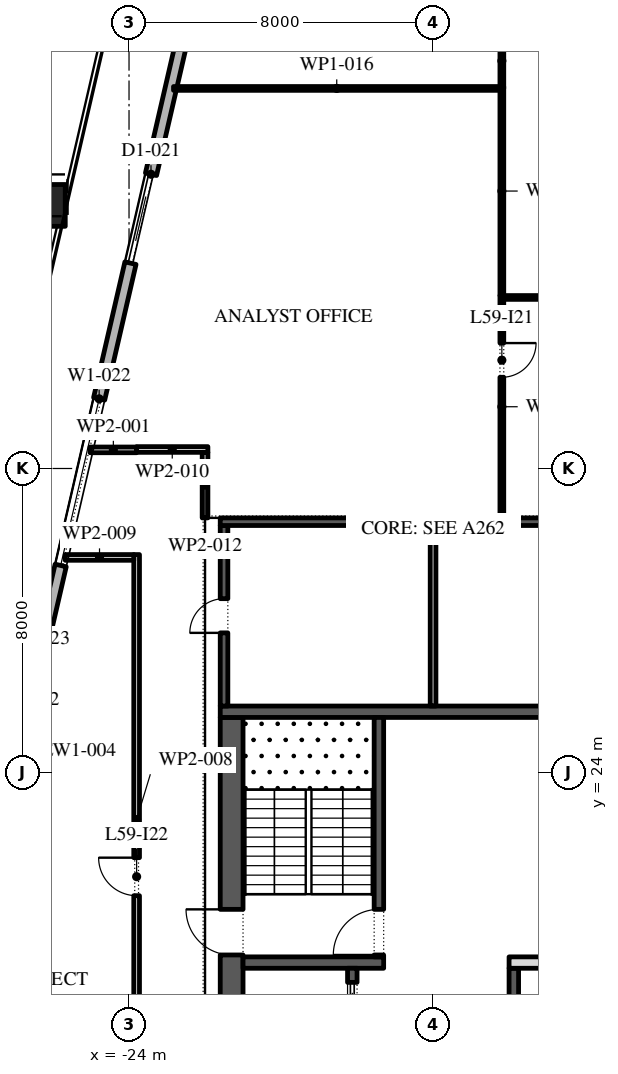
"""IFC4 building model, lengths in metres.
Left out: names, types, materials, properties, quantities, classifications, styles, units other than length and angle.
Written with IfcOpenShell. Run it as: python <this file> out.ifc"""

import sys

from ifc_helpers import new_model, si_unit, direction, frame, frame_2d, origin, origin_2d, place, context, subcontext, project, spatial, rectangle, extrude, element, fill, save


model = new_model("IFC4")
c1 = context("Model", 3, precision=1e-05, world=origin(), true_north=direction((0.0, 1.0)))
c2 = subcontext(c1, "Body", "Model", "MODEL_VIEW")
j1 = project(units=[si_unit("LENGTHUNIT", "METRE"), si_unit("PLANEANGLEUNIT", "RADIAN")], contexts=[c1])
p1 = place(None, origin())
s1 = spatial("IfcSite", under=j1, at=p1, CompositionType="ELEMENT")
p2 = place(p1, origin())
s2 = spatial("IfcBuilding", under=s1, at=p2, CompositionType="ELEMENT")
p3 = place(p2, frame((0.0, 0.0, 272.4)))
s3 = spatial("IfcBuildingStorey", under=s2, at=p3, CompositionType="ELEMENT", Elevation=272.4)
p4 = place(p3, frame((-26.228, 38.922, 0.0), z_axis=(0.014558945825, 0.063166103598, 0.997896828561), x_axis=(-0.97445148511, 0.224598092528, 0.0)))
e1 = element("IfcColumn", 1, at=p4, inside=s3, PredefinedType="COLUMN", context=c2, shape_type="SweptSolid", body=[
    extrude(rectangle(XDim=1.1, YDim=1.1, at=origin_2d()), origin(), (0.0, 0.0, 1.0), 4.209),
])
p5 = place(p3, frame((29.616, 40.758, 0.0), z_axis=(0.0, 0.0, 1.0), x_axis=(-0.974370532314, 0.224949029246, 0.0)))
e2 = element("IfcWall", 2, at=p5, inside=s3, PredefinedType="STANDARD", context=c2, shape_type="SweptSolid", body=[
    extrude(rectangle(XDim=48.0, YDim=0.3, at=frame_2d((24.0, 0.0))), origin(), (0.0, 0.0, 1.0), 4.0),
])
p6 = place(p5, frame((1.625, 0.0, 0.45)))
e3 = element("IfcOpeningElement", 3, at=p6, cuts=e2, PredefinedType="OPENING", context=c2, shape_type="SweptSolid", body=[
    extrude(rectangle(XDim=4.5, YDim=2.575, at=frame_2d((2.25, 1.288))), frame((0.0, 0.16, 0.0), z_axis=(0.0, -1.0, 0.0), x_axis=(1.0, 0.0, 0.0)), (0.0, 0.0, 1.0), 0.32),
])
p7 = place(p5, frame((10.575, 0.0, 0.0)))
e4 = element("IfcOpeningElement", 4, at=p7, cuts=e2, PredefinedType="OPENING", context=c2, shape_type="SweptSolid", body=[
    extrude(rectangle(XDim=2.4, YDim=3.5, at=frame_2d((1.2, 1.75))), frame((0.0, 0.16, 0.0), z_axis=(0.0, -1.0, 0.0), x_axis=(1.0, 0.0, 0.0)), (0.0, 0.0, 1.0), 0.32),
])
p8 = place(p5, frame((17.575, 0.0, 0.45)))
e5 = element("IfcOpeningElement", 5, at=p8, cuts=e2, PredefinedType="OPENING", context=c2, shape_type="SweptSolid", body=[
    extrude(rectangle(XDim=4.5, YDim=2.45, at=frame_2d((2.25, 1.225))), frame((0.0, 0.16, 0.0), z_axis=(0.0, -1.0, 0.0), x_axis=(1.0, 0.0, 0.0)), (0.0, 0.0, 1.0), 0.32),
])
p9 = place(p5, frame((25.625, 0.0, 0.45)))
e6 = element("IfcOpeningElement", 6, at=p9, cuts=e2, PredefinedType="OPENING", context=c2, shape_type="SweptSolid", body=[
    extrude(rectangle(XDim=4.5, YDim=2.45, at=frame_2d((2.25, 1.225))), frame((0.0, 0.16, 0.0), z_axis=(0.0, -1.0, 0.0), x_axis=(1.0, 0.0, 0.0)), (0.0, 0.0, 1.0), 0.32),
])
p10 = place(p5, frame((33.675, 0.0, 0.45)))
e7 = element("IfcOpeningElement", 7, at=p10, cuts=e2, PredefinedType="OPENING", context=c2, shape_type="SweptSolid", body=[
    extrude(rectangle(XDim=4.5, YDim=2.45, at=frame_2d((2.25, 1.225))), frame((0.0, 0.16, 0.0), z_axis=(0.0, -1.0, 0.0), x_axis=(1.0, 0.0, 0.0)), (0.0, 0.0, 1.0), 0.32),
])
p11 = place(p5, frame((42.175, 0.0, 0.0)))
e8 = element("IfcOpeningElement", 8, at=p11, cuts=e2, PredefinedType="OPENING", context=c2, shape_type="SweptSolid", body=[
    extrude(rectangle(XDim=2.4, YDim=3.5, at=frame_2d((1.2, 1.75))), frame((0.0, 0.16, 0.0), z_axis=(0.0, -1.0, 0.0), x_axis=(1.0, 0.0, 0.0)), (0.0, 0.0, 1.0), 0.32),
])
p12 = place(p3, frame((-21.359, 48.678, 0.0), z_axis=(0.0, 0.0, 1.0), x_axis=(-0.224949198343, -0.974370493275, 0.0)))
e9 = element("IfcWall", 9, at=p12, inside=s3, PredefinedType="STANDARD", context=c2, shape_type="SweptSolid", body=[
    extrude(rectangle(XDim=49.5, YDim=0.3, at=frame_2d((24.75, 0.0))), origin(), (0.0, 0.0, 1.0), 4.0),
])
p13 = place(p12, frame((1.157, 0.0, 0.45)))
e10 = element("IfcOpeningElement", 10, at=p13, cuts=e9, PredefinedType="OPENING", context=c2, shape_type="SweptSolid", body=[
    extrude(rectangle(XDim=4.5, YDim=3.05, at=frame_2d((2.25, 1.525))), frame((0.0, 0.16, 0.0), z_axis=(0.0, -1.0, 0.0), x_axis=(1.0, 0.0, 0.0)), (0.0, 0.0, 1.0), 0.32),
])
p14 = place(p12, frame((9.171, 0.0, 0.0)))
e11 = element("IfcOpeningElement", 11, at=p14, cuts=e9, PredefinedType="OPENING", context=c2, shape_type="SweptSolid", body=[
    extrude(rectangle(XDim=2.4, YDim=3.5, at=frame_2d((1.2, 1.75))), frame((0.0, 0.16, 0.0), z_axis=(0.0, -1.0, 0.0), x_axis=(1.0, 0.0, 0.0)), (0.0, 0.0, 1.0), 0.32),
])
p15 = place(p12, frame((15.236, 0.0, 0.45)))
e12 = element("IfcOpeningElement", 12, at=p15, cuts=e9, PredefinedType="OPENING", context=c2, shape_type="SweptSolid", body=[
    extrude(rectangle(XDim=4.5, YDim=3.05, at=frame_2d((2.25, 1.525))), frame((0.0, 0.16, 0.0), z_axis=(0.0, -1.0, 0.0), x_axis=(1.0, 0.0, 0.0)), (0.0, 0.0, 1.0), 0.32),
])
p16 = place(p12, frame((22.35, 0.0, 0.45)))
e13 = element("IfcOpeningElement", 13, at=p16, cuts=e9, PredefinedType="OPENING", context=c2, shape_type="SweptSolid", body=[
    extrude(rectangle(XDim=4.5, YDim=3.05, at=frame_2d((2.25, 1.525))), frame((0.0, 0.16, 0.0), z_axis=(0.0, -1.0, 0.0), x_axis=(1.0, 0.0, 0.0)), (0.0, 0.0, 1.0), 0.32),
])
p17 = place(p12, frame((29.464, 0.0, 0.45)))
e14 = element("IfcOpeningElement", 14, at=p17, cuts=e9, PredefinedType="OPENING", context=c2, shape_type="SweptSolid", body=[
    extrude(rectangle(XDim=4.5, YDim=3.05, at=frame_2d((2.25, 1.525))), frame((0.0, 0.16, 0.0), z_axis=(0.0, -1.0, 0.0), x_axis=(1.0, 0.0, 0.0)), (0.0, 0.0, 1.0), 0.32),
])
p18 = place(p12, frame((37.628, 0.0, 0.0)))
e15 = element("IfcOpeningElement", 15, at=p18, cuts=e9, PredefinedType="OPENING", context=c2, shape_type="SweptSolid", body=[
    extrude(rectangle(XDim=2.4, YDim=3.325, at=frame_2d((1.2, 1.663))), frame((0.0, 0.16, 0.0), z_axis=(0.0, -1.0, 0.0), x_axis=(1.0, 0.0, 0.0)), (0.0, 0.0, 1.0), 0.32),
])
p19 = place(p12, frame((43.693, 0.0, 0.45)))
e16 = element("IfcOpeningElement", 16, at=p19, cuts=e9, PredefinedType="OPENING", context=c2, shape_type="SweptSolid", body=[
    extrude(rectangle(XDim=4.5, YDim=2.825, at=frame_2d((2.25, 1.413))), frame((0.0, 0.16, 0.0), z_axis=(0.0, -1.0, 0.0), x_axis=(1.0, 0.0, 0.0)), (0.0, 0.0, 1.0), 0.32),
])
p20 = place(p3, frame((-21.3, -2.45, 0.0), z_axis=(0.0, 0.0, 1.0), x_axis=(0.0, 1.0, 0.0)))
e17 = element("IfcWall", 17, at=p20, inside=s3, PredefinedType="SHEAR", context=c2, shape_type="SweptSolid", body=[
    extrude(rectangle(XDim=27.9, YDim=0.6, at=frame_2d((13.95, 0.0))), origin(), (0.0, 0.0, 1.0), 4.0),
])
p21 = place(p20, frame((5.05, 0.0, 0.0)))
e18 = element("IfcOpeningElement", 18, at=p21, cuts=e17, PredefinedType="OPENING", context=c2, shape_type="SweptSolid", body=[
    extrude(rectangle(XDim=1.2, YDim=2.1, at=frame_2d((0.6, 1.05))), frame((0.0, 0.31, 0.0), z_axis=(0.0, -1.0, 0.0), x_axis=(1.0, 0.0, 0.0)), (0.0, 0.0, 1.0), 0.62),
])
p22 = place(p20, frame((21.65, 0.0, 0.0)))
e19 = element("IfcOpeningElement", 19, at=p22, cuts=e17, PredefinedType="OPENING", context=c2, shape_type="SweptSolid", body=[
    extrude(rectangle(XDim=1.2, YDim=2.1, at=frame_2d((0.6, 1.05))), frame((0.0, 0.31, 0.0), z_axis=(0.0, -1.0, 0.0), x_axis=(1.0, 0.0, 0.0)), (0.0, 0.0, 1.0), 0.62),
])
p23 = place(p3, frame((-21.6, 25.6, 0.0), z_axis=(0.0, 0.0, 1.0), x_axis=(1.0, 0.0, 0.0)))
e20 = element("IfcWall", 20, at=p23, inside=s3, PredefinedType="SHEAR", context=c2, shape_type="SweptSolid", body=[
    extrude(rectangle(XDim=11.2, YDim=0.3, at=frame_2d((5.6, 0.0))), origin(), (0.0, 0.0, 1.0), 4.0),
])
p24 = place(p3, frame((-21.0, 19.0, 0.0), z_axis=(0.0, 0.0, 1.0), x_axis=(1.0, 0.0, 0.0)))
e21 = element("IfcWall", 21, at=p24, inside=s3, PredefinedType="SHEAR", context=c2, shape_type="SweptSolid", body=[
    extrude(rectangle(XDim=3.7, YDim=0.3, at=frame_2d((1.85, 0.0))), origin(), (0.0, 0.0, 1.0), 4.0),
])
p25 = place(p3, frame((-17.425, 19.15, 0.0), z_axis=(0.0, 0.0, 1.0), x_axis=(0.0, 1.0, 0.0)))
e22 = element("IfcWall", 22, at=p25, inside=s3, PredefinedType="SHEAR", context=c2, shape_type="SweptSolid", body=[
    extrude(rectangle(XDim=6.3, YDim=0.25, at=frame_2d((3.15, 0.0))), origin(), (0.0, 0.0, 1.0), 4.0),
])
p26 = place(p25, frame((0.05, 0.0, 0.0)))
e23 = element("IfcOpeningElement", 23, at=p26, cuts=e22, PredefinedType="OPENING", context=c2, shape_type="SweptSolid", body=[
    extrude(rectangle(XDim=1.2, YDim=2.1, at=frame_2d((0.6, 1.05))), frame((0.0, 0.135, 0.0), z_axis=(0.0, -1.0, 0.0), x_axis=(1.0, 0.0, 0.0)), (0.0, 0.0, 1.0), 0.27),
])
p27 = place(p3, frame((-18.125, 4.15, 0.0), z_axis=(0.0, 0.0, 1.0), x_axis=(0.0, 1.0, 0.0)))
e24 = element("IfcWall", 24, at=p27, inside=s3, PredefinedType="SHEAR", context=c2, shape_type="SweptSolid", body=[
    extrude(rectangle(XDim=14.7, YDim=0.25, at=frame_2d((7.35, 0.0))), origin(), (0.0, 0.0, 1.0), 4.0),
])
p28 = place(p27, frame((3.246, 0.0, 0.0)))
e25 = element("IfcOpeningElement", 25, at=p28, cuts=e24, PredefinedType="OPENING", context=c2, shape_type="SweptSolid", body=[
    extrude(rectangle(XDim=0.9, YDim=2.1, at=frame_2d((0.45, 1.05))), frame((0.0, 0.135, 0.0), z_axis=(0.0, -1.0, 0.0), x_axis=(1.0, 0.0, 0.0)), (0.0, 0.0, 1.0), 0.27),
])
p29 = place(p27, frame((8.454, 0.0, 0.0)))
e26 = element("IfcOpeningElement", 26, at=p29, cuts=e24, PredefinedType="OPENING", context=c2, shape_type="SweptSolid", body=[
    extrude(rectangle(XDim=0.9, YDim=2.1, at=frame_2d((0.45, 1.05))), frame((0.0, 0.135, 0.0), z_axis=(0.0, -1.0, 0.0), x_axis=(1.0, 0.0, 0.0)), (0.0, 0.0, 1.0), 0.27),
])
p30 = place(p27, frame((0.371, 0.0, 0.0)))
e27 = element("IfcOpeningElement", 27, at=p30, cuts=e24, PredefinedType="OPENING", context=c2, shape_type="SweptSolid", body=[
    extrude(rectangle(XDim=1.1, YDim=2.1, at=frame_2d((0.55, 1.05))), frame((0.0, 0.135, 0.0), z_axis=(0.0, -1.0, 0.0), x_axis=(1.0, 0.0, 0.0)), (0.0, 0.0, 1.0), 0.27),
])
p31 = place(p27, frame((13.229, 0.0, 0.0)))
e28 = element("IfcOpeningElement", 28, at=p31, cuts=e24, PredefinedType="OPENING", context=c2, shape_type="SweptSolid", body=[
    extrude(rectangle(XDim=1.1, YDim=2.1, at=frame_2d((0.55, 1.05))), frame((0.0, 0.135, 0.0), z_axis=(0.0, -1.0, 0.0), x_axis=(1.0, 0.0, 0.0)), (0.0, 0.0, 1.0), 0.27),
])
p32 = place(p3, frame((-13.875, -2.45, 0.0), z_axis=(0.0, 0.0, 1.0), x_axis=(0.0, 1.0, 0.0)))
e29 = element("IfcWall", 29, at=p32, inside=s3, PredefinedType="SHEAR", context=c2, shape_type="SweptSolid", body=[
    extrude(rectangle(XDim=21.3, YDim=0.25, at=frame_2d((10.65, 0.0))), origin(), (0.0, 0.0, 1.0), 4.0),
])
p33 = place(p32, frame((16.261, 0.0, 0.0)))
e30 = element("IfcOpeningElement", 30, at=p33, cuts=e29, PredefinedType="OPENING", context=c2, shape_type="SweptSolid", body=[
    extrude(rectangle(XDim=0.9, YDim=2.1, at=frame_2d((0.45, 1.05))), frame((0.0, 0.135, 0.0), z_axis=(0.0, -1.0, 0.0), x_axis=(1.0, 0.0, 0.0)), (0.0, 0.0, 1.0), 0.27),
])
p34 = place(p32, frame((19.325, 0.0, 0.0)))
e31 = element("IfcOpeningElement", 31, at=p34, cuts=e29, PredefinedType="OPENING", context=c2, shape_type="SweptSolid", body=[
    extrude(rectangle(XDim=0.9, YDim=2.1, at=frame_2d((0.45, 1.05))), frame((0.0, 0.135, 0.0), z_axis=(0.0, -1.0, 0.0), x_axis=(1.0, 0.0, 0.0)), (0.0, 0.0, 1.0), 0.27),
])
p35 = place(p32, frame((6.971, 0.0, 0.0)))
e32 = element("IfcOpeningElement", 32, at=p35, cuts=e29, PredefinedType="OPENING", context=c2, shape_type="SweptSolid", body=[
    extrude(rectangle(XDim=1.1, YDim=2.1, at=frame_2d((0.55, 1.05))), frame((0.0, 0.135, 0.0), z_axis=(0.0, -1.0, 0.0), x_axis=(1.0, 0.0, 0.0)), (0.0, 0.0, 1.0), 0.27),
])
p36 = place(p32, frame((9.114, 0.0, 0.0)))
e33 = element("IfcOpeningElement", 33, at=p36, cuts=e29, PredefinedType="OPENING", context=c2, shape_type="SweptSolid", body=[
    extrude(rectangle(XDim=1.1, YDim=2.1, at=frame_2d((0.55, 1.05))), frame((0.0, 0.135, 0.0), z_axis=(0.0, -1.0, 0.0), x_axis=(1.0, 0.0, 0.0)), (0.0, 0.0, 1.0), 0.27),
])
p37 = place(p32, frame((11.257, 0.0, 0.0)))
e34 = element("IfcOpeningElement", 34, at=p37, cuts=e29, PredefinedType="OPENING", context=c2, shape_type="SweptSolid", body=[
    extrude(rectangle(XDim=1.1, YDim=2.1, at=frame_2d((0.55, 1.05))), frame((0.0, 0.135, 0.0), z_axis=(0.0, -1.0, 0.0), x_axis=(1.0, 0.0, 0.0)), (0.0, 0.0, 1.0), 0.27),
])
p38 = place(p32, frame((13.4, 0.0, 0.0)))
e35 = element("IfcOpeningElement", 35, at=p38, cuts=e29, PredefinedType="OPENING", context=c2, shape_type="SweptSolid", body=[
    extrude(rectangle(XDim=1.1, YDim=2.1, at=frame_2d((0.55, 1.05))), frame((0.0, 0.135, 0.0), z_axis=(0.0, -1.0, 0.0), x_axis=(1.0, 0.0, 0.0)), (0.0, 0.0, 1.0), 0.27),
])
p39 = place(p3, frame((-14.0, 19.0, 0.0), z_axis=(0.0, 0.0, 1.0), x_axis=(1.0, 0.0, 0.0)))
e36 = element("IfcWall", 36, at=p39, inside=s3, PredefinedType="PARTITIONING", context=c2, shape_type="SweptSolid", body=[
    extrude(rectangle(XDim=3.0, YDim=0.3, at=frame_2d((1.5, 0.0))), origin(), (0.0, 0.0, 1.0), 4.0),
])
p40 = place(p3, frame((-21.5, 25.75, 0.0), z_axis=(0.0, 0.0, 1.0), x_axis=(0.0, 1.0, 0.0)))
e37 = element("IfcWall", 37, at=p40, inside=s3, PredefinedType="SHEAR", context=c2, shape_type="SweptSolid", body=[
    extrude(rectangle(XDim=4.75, YDim=0.2, at=frame_2d((2.375, 0.0))), origin(), (0.0, 0.0, 1.0), 4.0),
])
p41 = place(p40, frame((1.925, 0.0, 0.0)))
e38 = element("IfcOpeningElement", 38, at=p41, cuts=e37, PredefinedType="OPENING", context=c2, shape_type="SweptSolid", body=[
    extrude(rectangle(XDim=0.9, YDim=2.1, at=frame_2d((0.45, 1.05))), frame((0.0, 0.11, 0.0), z_axis=(0.0, -1.0, 0.0), x_axis=(1.0, 0.0, 0.0)), (0.0, 0.0, 1.0), 0.22),
])
p42 = place(p3, frame((-21.6, 30.6, 0.0), z_axis=(0.0, 0.0, 1.0), x_axis=(1.0, 0.0, 0.0)))
e39 = element("IfcWall", 39, at=p42, inside=s3, PredefinedType="SHEAR", context=c2, shape_type="SweptSolid", body=[
    extrude(rectangle(XDim=11.2, YDim=0.2, at=frame_2d((5.6, 0.0))), origin(), (0.0, 0.0, 1.0), 4.0),
])
p43 = place(p3, frame((-16.0, 25.75, 0.0), z_axis=(0.0, 0.0, 1.0), x_axis=(0.0, 1.0, 0.0)))
e40 = element("IfcWall", 40, at=p43, inside=s3, PredefinedType="PARTITIONING", context=c2, shape_type="SweptSolid", body=[
    extrude(rectangle(XDim=4.75, YDim=0.15, at=frame_2d((2.375, 0.0))), origin(), (0.0, 0.0, 1.0), 4.0),
])
p44 = place(p3, frame((-25.025, 32.49, 0.0), z_axis=(0.0, 0.0, 1.0), x_axis=(1.0, 0.0, 0.0)))
e41 = element("IfcWall", 41, at=p44, inside=s3, PredefinedType="PARTITIONING", context=c2, shape_type="SweptSolid", body=[
    extrude(rectangle(XDim=1.225, YDim=0.15, at=frame_2d((0.612, 0.0))), origin(), (0.0, 0.0, 1.0), 4.0),
])
p45 = place(p3, frame((-23.8, 15.79, 0.0), z_axis=(0.0, 0.0, 1.0), x_axis=(0.0, 1.0, 0.0)))
e42 = element("IfcWall", 42, at=p45, inside=s3, PredefinedType="PARTITIONING", context=c2, shape_type="SweptSolid", body=[
    extrude(rectangle(XDim=13.945, YDim=0.15, at=frame_2d((6.973, 0.0))), origin(), (0.0, 0.0, 1.0), 4.0),
])
p46 = place(p45, frame((4.97, 0.0, 0.0)))
e43 = element("IfcOpeningElement", 43, at=p46, cuts=e42, PredefinedType="OPENING", context=c2, shape_type="SweptSolid", body=[
    extrude(rectangle(XDim=1.0, YDim=2.1, at=frame_2d((0.5, 1.05))), frame((0.0, 0.085, 0.0), z_axis=(0.0, -1.0, 0.0), x_axis=(1.0, 0.0, 0.0)), (0.0, 0.0, 1.0), 0.17),
])
p47 = place(p3, frame((-23.875, 29.66, 0.0), z_axis=(0.0, 0.0, 1.0), x_axis=(-1.0, 0.0, 0.0)))
e44 = element("IfcWall", 44, at=p47, inside=s3, PredefinedType="PARTITIONING", context=c2, shape_type="SweptSolid", body=[
    extrude(rectangle(XDim=1.803, YDim=0.15, at=frame_2d((0.901, 0.0))), origin(), (0.0, 0.0, 1.0), 4.0),
])
p48 = place(p3, frame((-23.8, 32.5, 0.0), z_axis=(0.0, 0.0, 1.0), x_axis=(1.0, 0.0, 0.0)))
e45 = element("IfcWall", 45, at=p48, inside=s3, PredefinedType="PARTITIONING", context=c2, shape_type="SweptSolid", body=[
    extrude(rectangle(XDim=1.875, YDim=0.15, at=frame_2d((0.938, 0.0))), origin(), (0.0, 0.0, 1.0), 4.0),
])
p49 = place(p3, frame((-22.0, 32.425, 0.0), z_axis=(0.0, 0.0, 1.0), x_axis=(0.0, -1.0, 0.0)))
e46 = element("IfcWall", 46, at=p49, inside=s3, PredefinedType="PARTITIONING", context=c2, shape_type="SweptSolid", body=[
    extrude(rectangle(XDim=1.725, YDim=0.15, at=frame_2d((0.863, 0.0))), origin(), (0.0, 0.0, 1.0), 4.0),
])
p50 = place(p3, frame((-14.19, 30.7, 0.0), z_axis=(0.0, 0.0, 1.0), x_axis=(0.0, 1.0, 0.0)))
e47 = element("IfcWall", 47, at=p50, inside=s3, PredefinedType="PARTITIONING", context=c2, shape_type="SweptSolid", body=[
    extrude(rectangle(XDim=5.85, YDim=0.1, at=frame_2d((2.925, 0.0))), origin(), (0.0, 0.0, 1.0), 4.0),
])
p51 = place(p50, frame((3.7, 0.0, 0.0)))
e48 = element("IfcOpeningElement", 48, at=p51, cuts=e47, PredefinedType="OPENING", context=c2, shape_type="SweptSolid", body=[
    extrude(rectangle(XDim=0.9, YDim=2.1, at=frame_2d((0.45, 1.05))), frame((0.0, 0.06, 0.0), z_axis=(0.0, -1.0, 0.0), x_axis=(1.0, 0.0, 0.0)), (0.0, 0.0, 1.0), 0.12),
])
p52 = place(p3, frame((-14.19, 36.55, 0.0), z_axis=(0.0, 0.0, 1.0), x_axis=(0.0, 1.0, 0.0)))
e49 = element("IfcWall", 49, at=p52, inside=s3, PredefinedType="PARTITIONING", context=c2, shape_type="SweptSolid", body=[
    extrude(rectangle(XDim=5.5, YDim=0.1, at=frame_2d((2.75, 0.0))), origin(), (0.0, 0.0, 1.0), 4.0),
])
p53 = place(p3, frame((-14.14, 36.5, 0.0), z_axis=(0.0, 0.0, 1.0), x_axis=(1.0, 0.0, 0.0)))
e50 = element("IfcWall", 50, at=p53, inside=s3, PredefinedType="PARTITIONING", context=c2, shape_type="SweptSolid", body=[
    extrude(rectangle(XDim=8.19, YDim=0.1, at=frame_2d((4.095, 0.0))), origin(), (0.0, 0.0, 1.0), 4.0),
])
p54 = place(p53, frame((2.79, 0.0, 0.0)))
e51 = element("IfcOpeningElement", 51, at=p54, cuts=e50, PredefinedType="OPENING", context=c2, shape_type="SweptSolid", body=[
    extrude(rectangle(XDim=0.9, YDim=2.1, at=frame_2d((0.45, 1.05))), frame((0.0, 0.06, 0.0), z_axis=(0.0, -1.0, 0.0), x_axis=(1.0, 0.0, 0.0)), (0.0, 0.0, 1.0), 0.12),
])
p55 = place(p3, frame((-14.24, 42.0, 0.0), z_axis=(0.0, 0.0, 1.0), x_axis=(-1.0, 0.0, 0.0)))
e52 = element("IfcWall", 52, at=p55, inside=s3, PredefinedType="PARTITIONING", context=c2, shape_type="SweptSolid", body=[
    extrude(rectangle(XDim=8.589, YDim=0.1, at=frame_2d((4.294, 0.0))), origin(), (0.0, 0.0, 1.0), 4.0),
])
p56 = place(p3, frame((-14.19, 42.0, 0.0), z_axis=(0.0, 0.0, 1.0), x_axis=(0.0, 1.0, 0.0)))
e53 = element("IfcWall", 53, at=p56, inside=s3, PredefinedType="PARTITIONING", context=c2, shape_type="SweptSolid", body=[
    extrude(rectangle(XDim=1.45, YDim=0.1, at=frame_2d((0.725, 0.0))), origin(), (0.0, 0.0, 1.0), 4.0),
])
p57 = place(p14, origin())
e54 = element("IfcDoor", 54, at=p57, inside=s3, OperationType="DOUBLE_DOOR_SLIDING", PredefinedType="DOOR", context=c2, shape_type="SweptSolid", body=[
    extrude(rectangle(XDim=2.4, YDim=3.5, at=frame_2d((1.2, 1.75))), frame((0.0, 0.025, 0.0), z_axis=(0.0, -1.0, 0.0), x_axis=(1.0, 0.0, 0.0)), (0.0, 0.0, 1.0), 0.05),
])
fill(e11, e54)
p58 = place(p15, origin())
e55 = element("IfcWindow", 55, at=p58, inside=s3, PartitioningType="DOUBLE_PANEL_VERTICAL", PredefinedType="WINDOW", context=c2, shape_type="SweptSolid", body=[
    extrude(rectangle(XDim=4.5, YDim=3.05, at=frame_2d((2.25, 1.525))), frame((0.0, 0.03, 0.0), z_axis=(0.0, -1.0, 0.0), x_axis=(1.0, 0.0, 0.0)), (0.0, 0.0, 1.0), 0.06),
])
fill(e12, e55)
p59 = place(p31, origin())
e56 = element("IfcDoor", 56, at=p59, inside=s3, OperationType="SLIDING_TO_LEFT", PredefinedType="DOOR", context=c2, shape_type="SweptSolid", body=[
    extrude(rectangle(XDim=1.1, YDim=2.1, at=frame_2d((0.55, 1.05))), frame((0.0, 0.025, 0.0), z_axis=(0.0, -1.0, 0.0), x_axis=(1.0, 0.0, 0.0)), (0.0, 0.0, 1.0), 0.05),
])
fill(e28, e56)
p60 = place(p26, origin())
e57 = element("IfcDoor", 57, at=p60, inside=s3, OperationType="SINGLE_SWING_RIGHT", PredefinedType="DOOR", context=c2, shape_type="SweptSolid", body=[
    extrude(rectangle(XDim=1.2, YDim=2.1, at=frame_2d((0.6, 1.05))), frame((0.0, 0.025, 0.0), z_axis=(0.0, -1.0, 0.0), x_axis=(1.0, 0.0, 0.0)), (0.0, 0.0, 1.0), 0.05),
])
fill(e23, e57)
p61 = place(p22, origin())
e58 = element("IfcDoor", 58, at=p61, inside=s3, OperationType="SINGLE_SWING_LEFT", PredefinedType="DOOR", context=c2, shape_type="SweptSolid", body=[
    extrude(rectangle(XDim=1.2, YDim=2.1, at=frame_2d((0.6, 1.05))), frame((0.0, 0.025, 0.0), z_axis=(0.0, -1.0, 0.0), x_axis=(1.0, 0.0, 0.0)), (0.0, 0.0, 1.0), 0.05),
])
fill(e19, e58)
p62 = place(p41, origin())
e59 = element("IfcDoor", 59, at=p62, inside=s3, OperationType="SINGLE_SWING_RIGHT", PredefinedType="DOOR", context=c2, shape_type="SweptSolid", body=[
    extrude(rectangle(XDim=0.9, YDim=2.1, at=frame_2d((0.45, 1.05))), frame((0.0, -0.05, 0.0), z_axis=(0.0, -1.0, 0.0), x_axis=(1.0, 0.0, 0.0)), (0.0, 0.0, 1.0), 0.05),
])
fill(e38, e59)
p63 = place(p51, frame((0.9, 0.0, 0.0), z_axis=(0.0, 0.0, 1.0), x_axis=(-1.0, 0.0, 0.0)))
e60 = element("IfcDoor", 60, at=p63, inside=s3, OperationType="SINGLE_SWING_RIGHT", PredefinedType="DOOR", context=c2, shape_type="SweptSolid", body=[
    extrude(rectangle(XDim=0.9, YDim=2.1, at=frame_2d((0.45, 1.05))), frame((0.0, 0.025, 0.0), z_axis=(0.0, -1.0, 0.0), x_axis=(1.0, 0.0, 0.0)), (0.0, 0.0, 1.0), 0.05),
])
fill(e48, e60)
p64 = place(p46, origin())
e61 = element("IfcDoor", 61, at=p64, inside=s3, OperationType="SINGLE_SWING_LEFT", PredefinedType="DOOR", context=c2, shape_type="SweptSolid", body=[
    extrude(rectangle(XDim=1.0, YDim=2.1, at=frame_2d((0.5, 1.05))), frame((0.0, 0.025, 0.0), z_axis=(0.0, -1.0, 0.0), x_axis=(1.0, 0.0, 0.0)), (0.0, 0.0, 1.0), 0.05),
])
fill(e43, e61)
save(model, sys.argv[1])
